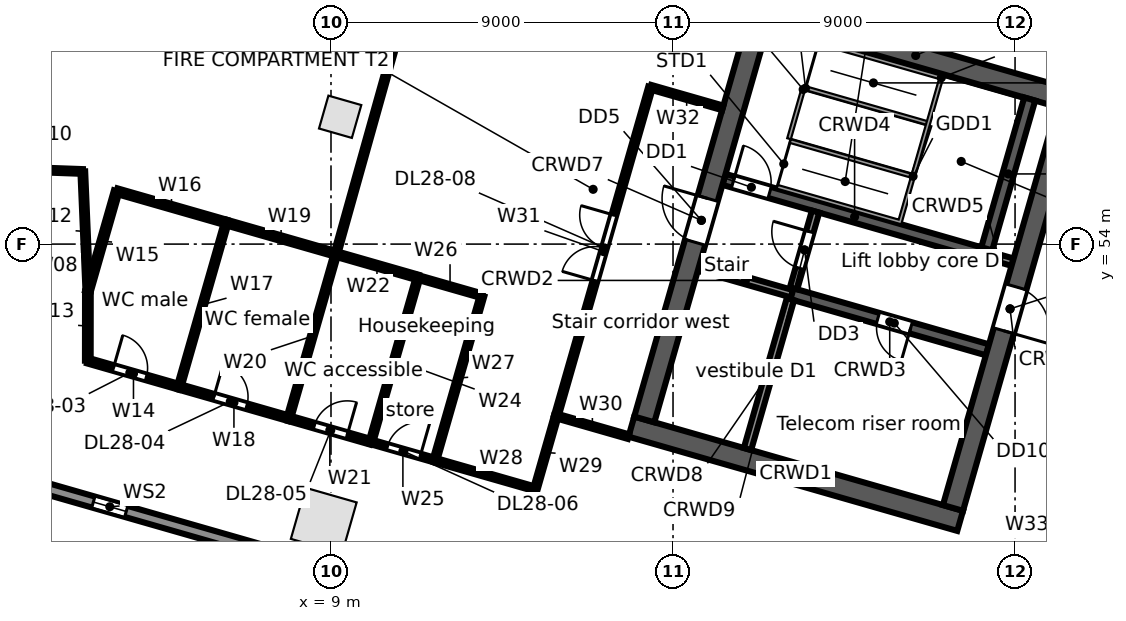
"""IFC4 building model, lengths in metres.
Left out: names, types, materials, properties, quantities, classifications, styles, units other than length and angle.
Written with IfcOpenShell. Run it as: python <this file> out.ifc"""

import sys

from ifc_helpers import new_model, si_unit, direction, frame, frame_2d, origin, origin_2d, place, context, subcontext, project, spatial, rectangle, extrude, element, fill, save


model = new_model("IFC4")
c1 = context("Model", 3, precision=1e-05, world=origin(), true_north=direction((0.0, 1.0)))
c2 = subcontext(c1, "Body", "Model", "MODEL_VIEW")
j1 = project(units=[si_unit("LENGTHUNIT", "METRE"), si_unit("PLANEANGLEUNIT", "RADIAN")], contexts=[c1])
p1 = place(None, origin())
s1 = spatial("IfcSite", under=j1, at=p1, CompositionType="ELEMENT")
p2 = place(p1, origin())
s2 = spatial("IfcBuilding", under=s1, at=p2, CompositionType="ELEMENT")
p3 = place(p2, frame((0.0, 0.0, 145.5)))
s3 = spatial("IfcBuildingStorey", under=s2, at=p3, CompositionType="ELEMENT", Elevation=145.5)
p4 = place(p3, frame((8.81, 46.722, 0.0), z_axis=(0.0, 0.0, 1.0), x_axis=(0.961261695938, -0.275637355817, 0.0)))
e1 = element("IfcColumn", 1, at=p4, inside=s3, PredefinedType="COLUMN", context=c2, shape_type="SweptSolid", body=[
    extrude(rectangle(XDim=1.4, YDim=1.4, at=origin_2d()), origin(), (0.0, 0.0, 1.0), 4.4),
])
p5 = place(p3, frame((9.241, 57.35, 0.0), z_axis=(0.0, 0.0, 1.0), x_axis=(0.961261695938, -0.275637355817, 0.0)))
e2 = element("IfcColumn", 2, at=p5, inside=s3, PredefinedType="COLUMN", context=c2, shape_type="SweptSolid", body=[
    extrude(rectangle(XDim=0.9, YDim=0.9, at=origin_2d()), origin(), (0.0, 0.0, 1.0), 4.4),
])
p6 = place(p3, frame((25.398, 40.717, 0.0), z_axis=(0.0, 0.0, 1.0), x_axis=(-0.961262423262, 0.275634819324, 0.0)))
e3 = element("IfcWall", 3, at=p6, inside=s3, PredefinedType="STANDARD", context=c2, shape_type="SweptSolid", body=[
    extrude(rectangle(XDim=26.359, YDim=0.3, at=frame_2d((13.179, 0.0))), origin(), (0.0, 0.0, 1.0), 4.05),
])
p7 = place(p6, frame((22.664, 0.0, 0.6)))
e4 = element("IfcOpeningElement", 4, at=p7, cuts=e3, PredefinedType="OPENING", context=c2, shape_type="SweptSolid", body=[
    extrude(rectangle(XDim=0.9, YDim=2.8, at=frame_2d((0.45, 1.4))), frame((0.0, 0.16, 0.0), z_axis=(0.0, -1.0, 0.0), x_axis=(1.0, 0.0, 0.0)), (0.0, 0.0, 1.0), 0.32),
])
p8 = place(p6, frame((13.844, 0.0, 0.6)))
e5 = element("IfcOpeningElement", 5, at=p8, cuts=e3, PredefinedType="OPENING", context=c2, shape_type="SweptSolid", body=[
    extrude(rectangle(XDim=0.9, YDim=2.8, at=frame_2d((0.45, 1.4))), frame((0.0, 0.16, 0.0), z_axis=(0.0, -1.0, 0.0), x_axis=(1.0, 0.0, 0.0)), (0.0, 0.0, 1.0), 0.32),
])
p9 = place(p6, frame((5.023, 0.0, 0.6)))
e6 = element("IfcOpeningElement", 6, at=p9, cuts=e3, PredefinedType="OPENING", context=c2, shape_type="SweptSolid", body=[
    extrude(rectangle(XDim=0.9, YDim=2.8, at=frame_2d((0.45, 1.4))), frame((0.0, 0.16, 0.0), z_axis=(0.0, -1.0, 0.0), x_axis=(1.0, 0.0, 0.0)), (0.0, 0.0, 1.0), 0.32),
])
p10 = place(p3, frame((16.904, 49.197, 0.0), z_axis=(0.0, 0.0, 1.0), x_axis=(0.96126248289, -0.275634611374, 0.0)))
e7 = element("IfcWall", 7, at=p10, inside=s3, PredefinedType="SOLIDWALL", context=c2, shape_type="SweptSolid", body=[
    extrude(rectangle(XDim=9.0, YDim=0.55, at=frame_2d((4.5, 0.0))), origin(), (0.0, 0.0, 1.0), 4.05),
])
p11 = place(p3, frame((18.68, 53.396, 0.0), z_axis=(0.0, 0.0, 1.0), x_axis=(0.961234387647, -0.275732573349, 0.0)))
e8 = element("IfcWall", 8, at=p11, inside=s3, PredefinedType="SOLIDWALL", context=c2, shape_type="SweptSolid", body=[
    extrude(rectangle(XDim=2.55, YDim=0.2, at=frame_2d((1.275, 0.0))), origin(), (0.0, 0.0, 1.0), 4.05),
])
p12 = place(p3, frame((21.131, 52.692, 0.0), z_axis=(0.0, 0.0, 1.0), x_axis=(0.961265220997, -0.27562506218, 0.0)))
e9 = element("IfcWall", 9, at=p12, inside=s3, PredefinedType="SOLIDWALL", context=c2, shape_type="SweptSolid", body=[
    extrude(rectangle(XDim=5.35, YDim=0.3, at=frame_2d((2.675, 0.0))), origin(), (0.0, 0.0, 1.0), 4.05),
])
p13 = place(p12, frame((2.35, 0.0, 0.0)))
e10 = element("IfcOpeningElement", 10, at=p13, cuts=e9, PredefinedType="OPENING", context=c2, shape_type="SweptSolid", body=[
    extrude(rectangle(XDim=0.9, YDim=2.1, at=frame_2d((0.45, 1.05))), frame((0.0, 0.16, 0.0), z_axis=(0.0, -1.0, 0.0), x_axis=(1.0, 0.0, 0.0)), (0.0, 0.0, 1.0), 0.32),
])
p14 = place(p3, frame((19.341, 55.702, 0.0), z_axis=(0.0, 0.0, 1.0), x_axis=(0.961263228157, -0.27563201228, 0.0)))
e11 = element("IfcWall", 11, at=p14, inside=s3, PredefinedType="SOLIDWALL", context=c2, shape_type="SweptSolid", body=[
    extrude(rectangle(XDim=7.15, YDim=0.3, at=frame_2d((3.575, 0.0))), origin(), (0.0, 0.0, 1.0), 4.05),
])
p15 = place(p14, frame((0.25, 0.0, 0.0)))
e12 = element("IfcOpeningElement", 12, at=p15, cuts=e11, PredefinedType="OPENING", context=c2, shape_type="SweptSolid", body=[
    extrude(rectangle(XDim=1.0, YDim=2.1, at=frame_2d((0.5, 1.05))), frame((0.0, 0.16, 0.0), z_axis=(0.0, -1.0, 0.0), x_axis=(1.0, 0.0, 0.0)), (0.0, 0.0, 1.0), 0.32),
])
p16 = place(p3, frame((26.214, 53.732, 0.0), z_axis=(0.0, 0.0, 1.0), x_axis=(0.961240918172, -0.275709806194, 0.0)))
e13 = element("IfcWall", 13, at=p16, inside=s3, PredefinedType="SOLIDWALL", context=c2, shape_type="SweptSolid", body=[
    extrude(rectangle(XDim=0.75, YDim=0.2, at=frame_2d((0.375, 0.0))), origin(), (0.0, 0.0, 1.0), 4.05),
])
p17 = place(p3, frame((20.06, 60.204, 0.0), z_axis=(0.0, 0.0, 1.0), x_axis=(0.96126248289, -0.275634611374, 0.0)))
e14 = element("IfcWall", 14, at=p17, inside=s3, PredefinedType="SOLIDWALL", context=c2, shape_type="SweptSolid", body=[
    extrude(rectangle(XDim=9.0, YDim=0.55, at=frame_2d((4.5, 0.0))), origin(), (0.0, 0.0, 1.0), 4.05),
])
p18 = place(p3, frame((17.244, 49.386, 0.0), z_axis=(0.0, 0.0, 1.0), x_axis=(0.275632146085, 0.96126318979, 0.0)))
e15 = element("IfcWall", 15, at=p18, inside=s3, PredefinedType="SOLIDWALL", context=c2, shape_type="SweptSolid", body=[
    extrude(rectangle(XDim=10.9, YDim=0.55, at=frame_2d((5.45, 0.0))), origin(), (0.0, 0.0, 1.0), 4.05),
])
p19 = place(p18, frame((4.85, 0.0, 0.0)))
e16 = element("IfcOpeningElement", 16, at=p19, cuts=e15, PredefinedType="OPENING", context=c2, shape_type="SweptSolid", body=[
    extrude(rectangle(XDim=1.2, YDim=2.1, at=frame_2d((0.6, 1.05))), frame((0.0, 0.285, 0.0), z_axis=(0.0, -1.0, 0.0), x_axis=(1.0, 0.0, 0.0)), (0.0, 0.0, 1.0), 0.57),
])
p20 = place(p3, frame((19.959, 48.607, 0.0), z_axis=(0.0, 0.0, 1.0), x_axis=(0.275641165445, 0.961260603537, 0.0)))
e17 = element("IfcWall", 17, at=p20, inside=s3, PredefinedType="SOLIDWALL", context=c2, shape_type="SweptSolid", body=[
    extrude(rectangle(XDim=4.1, YDim=0.2, at=frame_2d((2.05, 0.0))), origin(), (0.0, 0.0, 1.0), 4.05),
])
p21 = place(p3, frame((21.172, 52.837, 0.0), z_axis=(0.0, 0.0, 1.0), x_axis=(0.275657676022, 0.961255868981, 0.0)))
e18 = element("IfcWall", 18, at=p21, inside=s3, PredefinedType="PARTITIONING", context=c2, shape_type="SweptSolid", body=[
    extrude(rectangle(XDim=2.1, YDim=0.2, at=frame_2d((1.05, 0.0))), origin(), (0.0, 0.0, 1.0), 4.05),
])
p22 = place(p21, frame((0.55, 0.0, 0.0)))
e19 = element("IfcOpeningElement", 19, at=p22, cuts=e18, PredefinedType="OPENING", context=c2, shape_type="SweptSolid", body=[
    extrude(rectangle(XDim=1.0, YDim=2.1, at=frame_2d((0.5, 1.05))), frame((0.0, 0.11, 0.0), z_axis=(0.0, -1.0, 0.0), x_axis=(1.0, 0.0, 0.0)), (0.0, 0.0, 1.0), 0.22),
])
p23 = place(p3, frame((26.256, 53.876, 0.0), z_axis=(0.0, 0.0, 1.0), x_axis=(0.275641165445, 0.961260603537, 0.0)))
e20 = element("IfcWall", 20, at=p23, inside=s3, PredefinedType="SOLIDWALL", context=c2, shape_type="SweptSolid", body=[
    extrude(rectangle(XDim=4.1, YDim=0.3, at=frame_2d((2.05, 0.0))), origin(), (0.0, 0.0, 1.0), 4.05),
])
p24 = place(p3, frame((25.366, 47.057, 0.0), z_axis=(0.0, 0.0, 1.0), x_axis=(0.275632146085, 0.96126318979, 0.0)))
e21 = element("IfcWall", 21, at=p24, inside=s3, PredefinedType="SOLIDWALL", context=c2, shape_type="SweptSolid", body=[
    extrude(rectangle(XDim=10.9, YDim=0.55, at=frame_2d((5.45, 0.0))), origin(), (0.0, 0.0, 1.0), 4.05),
])
p25 = place(p24, frame((4.85, 0.0, 0.0)))
e22 = element("IfcOpeningElement", 22, at=p25, cuts=e21, PredefinedType="OPENING", context=c2, shape_type="SweptSolid", body=[
    extrude(rectangle(XDim=1.2, YDim=2.1, at=frame_2d((0.6, 1.05))), frame((0.0, 0.285, 0.0), z_axis=(0.0, -1.0, 0.0), x_axis=(1.0, 0.0, 0.0)), (0.0, 0.0, 1.0), 0.57),
])
p26 = place(p3, frame((0.0, 56.0, 0.0), z_axis=(0.0, 0.0, 1.0), x_axis=(0.999349313684, -0.036068673934, 0.0)))
e23 = element("IfcWall", 23, at=p26, inside=s3, PredefinedType="PARTITIONING", context=c2, shape_type="SweptSolid", body=[
    extrude(rectangle(XDim=2.471, YDim=0.125, at=frame_2d((1.235, 0.0))), origin(), (0.0, 0.0, 1.0), 4.05),
])
p27 = place(p26, frame((0.7, 0.0, 0.0)))
e24 = element("IfcOpeningElement", 24, at=p27, cuts=e23, PredefinedType="OPENING", context=c2, shape_type="SweptSolid", body=[
    extrude(rectangle(XDim=0.9, YDim=2.1, at=frame_2d((0.45, 1.05))), frame((0.0, 0.073, 0.0), z_axis=(0.0, -1.0, 0.0), x_axis=(1.0, 0.0, 0.0)), (0.0, 0.0, 1.0), 0.145),
])
p28 = place(p3, frame((2.469, 55.911, 0.0), z_axis=(0.0, 0.0, 1.0), x_axis=(0.042391721597, -0.99910106693, 0.0)))
e25 = element("IfcWall", 25, at=p28, inside=s3, PredefinedType="PARTITIONING", context=c2, shape_type="SweptSolid", body=[
    extrude(rectangle(XDim=3.162, YDim=0.125, at=frame_2d((1.581, 0.0))), origin(), (0.0, 0.0, 1.0), 4.05),
])
p29 = place(p3, frame((2.601, 50.932, 0.0), z_axis=(0.0, 0.0, 1.0), x_axis=(0.001073104681, 0.999999424223, 0.0)))
e26 = element("IfcWall", 26, at=p29, inside=s3, PredefinedType="PARTITIONING", context=c2, shape_type="SweptSolid", body=[
    extrude(rectangle(XDim=1.82, YDim=0.15, at=frame_2d((0.91, 0.0))), origin(), (0.0, 0.0, 1.0), 4.05),
])
p30 = place(p3, frame((2.601, 50.932, 0.0), z_axis=(0.0, 0.0, 1.0), x_axis=(0.961265528111, -0.275623991092, 0.0)))
e27 = element("IfcWall", 27, at=p30, inside=s3, PredefinedType="PARTITIONING", context=c2, shape_type="SweptSolid", body=[
    extrude(rectangle(XDim=2.5, YDim=0.15, at=frame_2d((1.25, 0.0))), origin(), (0.0, 0.0, 1.0), 4.05),
])
p31 = place(p30, frame((0.7, 0.0, 0.0)))
e28 = element("IfcOpeningElement", 28, at=p31, cuts=e27, PredefinedType="OPENING", context=c2, shape_type="SweptSolid", body=[
    extrude(rectangle(XDim=0.9, YDim=2.1, at=frame_2d((0.45, 1.05))), frame((0.0, 0.085, 0.0), z_axis=(0.0, -1.0, 0.0), x_axis=(1.0, 0.0, 0.0)), (0.0, 0.0, 1.0), 0.17),
])
p32 = place(p3, frame((2.603, 52.752, 0.0), z_axis=(0.0, 0.0, 1.0), x_axis=(0.27569433145, 0.961245356611, 0.0)))
e29 = element("IfcWall", 29, at=p32, inside=s3, PredefinedType="PARTITIONING", context=c2, shape_type="SweptSolid", body=[
    extrude(rectangle(XDim=2.75, YDim=0.15, at=frame_2d((1.375, 0.0))), origin(), (0.0, 0.0, 1.0), 4.05),
])
p33 = place(p3, frame((3.361, 55.395, 0.0), z_axis=(0.0, 0.0, 1.0), x_axis=(0.961268664977, -0.27561305073, 0.0)))
e30 = element("IfcWall", 30, at=p33, inside=s3, PredefinedType="PARTITIONING", context=c2, shape_type="SweptSolid", body=[
    extrude(rectangle(XDim=3.0, YDim=0.15, at=frame_2d((1.5, 0.0))), origin(), (0.0, 0.0, 1.0), 4.05),
])
p34 = place(p3, frame((5.004, 50.243, 0.0), z_axis=(0.0, 0.0, 1.0), x_axis=(0.275838825927, 0.961203902464, 0.0)))
e31 = element("IfcWall", 31, at=p34, inside=s3, PredefinedType="PARTITIONING", context=c2, shape_type="SweptSolid", body=[
    extrude(rectangle(XDim=4.5, YDim=0.125, at=frame_2d((2.25, 0.0))), origin(), (0.0, 0.0, 1.0), 4.05),
])
p35 = place(p3, frame((5.004, 50.243, 0.0), z_axis=(0.0, 0.0, 1.0), x_axis=(0.961268664977, -0.27561305073, 0.0)))
e32 = element("IfcWall", 32, at=p35, inside=s3, PredefinedType="PARTITIONING", context=c2, shape_type="SweptSolid", body=[
    extrude(rectangle(XDim=3.0, YDim=0.15, at=frame_2d((1.5, 0.0))), origin(), (0.0, 0.0, 1.0), 4.05),
])
p36 = place(p35, frame((0.95, 0.0, 0.0)))
e33 = element("IfcOpeningElement", 33, at=p36, cuts=e32, PredefinedType="OPENING", context=c2, shape_type="SweptSolid", body=[
    extrude(rectangle(XDim=0.9, YDim=2.1, at=frame_2d((0.45, 1.05))), frame((0.0, 0.085, 0.0), z_axis=(0.0, -1.0, 0.0), x_axis=(1.0, 0.0, 0.0)), (0.0, 0.0, 1.0), 0.17),
])
p37 = place(p3, frame((6.245, 54.568, 0.0), z_axis=(0.0, 0.0, 1.0), x_axis=(0.961240918172, -0.275709806194, 0.0)))
e34 = element("IfcWall", 34, at=p37, inside=s3, PredefinedType="PARTITIONING", context=c2, shape_type="SweptSolid", body=[
    extrude(rectangle(XDim=3.0, YDim=0.15, at=frame_2d((1.5, 0.0))), origin(), (0.0, 0.0, 1.0), 3.23),
])
p38 = place(p3, frame((7.888, 49.416, 0.0), z_axis=(0.0, 0.0, 1.0), x_axis=(0.275803080638, 0.96121415965, 0.0)))
e35 = element("IfcWall", 35, at=p38, inside=s3, PredefinedType="PARTITIONING", context=c2, shape_type="SweptSolid", body=[
    extrude(rectangle(XDim=4.5, YDim=0.125, at=frame_2d((2.25, 0.0))), origin(), (0.0, 0.0, 1.0), 3.23),
])
p39 = place(p3, frame((7.888, 49.416, 0.0), z_axis=(0.0, 0.0, 1.0), x_axis=(0.9611628742, -0.275981755301, 0.0)))
e36 = element("IfcWall", 36, at=p39, inside=s3, PredefinedType="PARTITIONING", context=c2, shape_type="SweptSolid", body=[
    extrude(rectangle(XDim=2.25, YDim=0.15, at=frame_2d((1.125, 0.0))), origin(), (0.0, 0.0, 1.0), 3.118),
])
p40 = place(p39, frame((0.7, 0.0, 0.0)))
e37 = element("IfcOpeningElement", 37, at=p40, cuts=e36, PredefinedType="OPENING", context=c2, shape_type="SweptSolid", body=[
    extrude(rectangle(XDim=0.9, YDim=2.1, at=frame_2d((0.45, 1.05))), frame((0.0, 0.085, 0.0), z_axis=(0.0, -1.0, 0.0), x_axis=(1.0, 0.0, 0.0)), (0.0, 0.0, 1.0), 0.17),
])
p41 = place(p3, frame((9.129, 53.741, 0.0), z_axis=(0.0, 0.0, 1.0), x_axis=(0.961273691875, -0.275595517578, 0.0)))
e38 = element("IfcWall", 38, at=p41, inside=s3, PredefinedType="PARTITIONING", context=c2, shape_type="SweptSolid", body=[
    extrude(rectangle(XDim=2.249, YDim=0.15, at=frame_2d((1.125, 0.0))), origin(), (0.0, 0.0, 1.0), 3.118),
])
p42 = place(p3, frame((9.129, 53.741, 0.0), z_axis=(0.0, 0.0, 1.0), x_axis=(0.269791738843, 0.962918697322, 0.0)))
e39 = element("IfcWall", 39, at=p42, inside=s3, PredefinedType="PARTITIONING", context=c2, shape_type="SweptSolid", body=[
    extrude(rectangle(XDim=14.886, YDim=0.125, at=frame_2d((7.443, 0.0))), origin(), (0.0, 0.0, 1.0), 3.118),
])
p43 = place(p3, frame((10.051, 48.795, 0.0), z_axis=(0.0, 0.0, 1.0), x_axis=(0.275530671241, 0.961292280841, 0.0)))
e40 = element("IfcWall", 40, at=p43, inside=s3, PredefinedType="PARTITIONING", context=c2, shape_type="SweptSolid", body=[
    extrude(rectangle(XDim=4.5, YDim=0.125, at=frame_2d((2.25, 0.0))), origin(), (0.0, 0.0, 1.0), 4.05),
])
p44 = place(p3, frame((10.051, 48.795, 0.0), z_axis=(0.0, 0.0, 1.0), x_axis=(0.961313033798, -0.275458256455, 0.0)))
e41 = element("IfcWall", 41, at=p44, inside=s3, PredefinedType="PARTITIONING", context=c2, shape_type="SweptSolid", body=[
    extrude(rectangle(XDim=1.75, YDim=0.125, at=frame_2d((0.875, 0.0))), origin(), (0.0, 0.0, 1.0), 4.05),
])
p45 = place(p44, frame((0.45, 0.0, 0.0)))
e42 = element("IfcOpeningElement", 42, at=p45, cuts=e41, PredefinedType="OPENING", context=c2, shape_type="SweptSolid", body=[
    extrude(rectangle(XDim=0.9, YDim=2.1, at=frame_2d((0.45, 1.05))), frame((0.0, 0.073, 0.0), z_axis=(0.0, -1.0, 0.0), x_axis=(1.0, 0.0, 0.0)), (0.0, 0.0, 1.0), 0.145),
])
p46 = place(p3, frame((11.291, 53.121, 0.0), z_axis=(0.0, 0.0, 1.0), x_axis=(0.961329010357, -0.275402494264, 0.0)))
e43 = element("IfcWall", 43, at=p46, inside=s3, PredefinedType="PARTITIONING", context=c2, shape_type="SweptSolid", body=[
    extrude(rectangle(XDim=1.751, YDim=0.125, at=frame_2d((0.875, 0.0))), origin(), (0.0, 0.0, 1.0), 4.05),
])
p47 = place(p3, frame((11.733, 48.313, 0.0), z_axis=(0.0, 0.0, 1.0), x_axis=(0.275795676316, 0.961216284155, 0.0)))
e44 = element("IfcWall", 44, at=p47, inside=s3, PredefinedType="PARTITIONING", context=c2, shape_type="SweptSolid", body=[
    extrude(rectangle(XDim=4.5, YDim=0.125, at=frame_2d((2.25, 0.0))), origin(), (0.0, 0.0, 1.0), 4.05),
])
p48 = place(p3, frame((11.733, 48.313, 0.0), z_axis=(0.0, 0.0, 1.0), x_axis=(0.961272337704, -0.275600240865, 0.0)))
e45 = element("IfcWall", 45, at=p48, inside=s3, PredefinedType="PARTITIONING", context=c2, shape_type="SweptSolid", body=[
    extrude(rectangle(XDim=2.75, YDim=0.125, at=frame_2d((1.375, 0.0))), origin(), (0.0, 0.0, 1.0), 4.05),
])
p49 = place(p3, frame((14.377, 47.555, 0.0), z_axis=(0.0, 0.0, 1.0), x_axis=(0.275446387355, 0.961316434736, 0.0)))
e46 = element("IfcWall", 46, at=p49, inside=s3, PredefinedType="PARTITIONING", context=c2, shape_type="SweptSolid", body=[
    extrude(rectangle(XDim=2.0, YDim=0.125, at=frame_2d((1.0, 0.0))), origin(), (0.0, 0.0, 1.0), 4.05),
])
p50 = place(p3, frame((14.928, 49.478, 0.0), z_axis=(0.0, 0.0, 1.0), x_axis=(0.961243778232, -0.27569983462, 0.0)))
e47 = element("IfcWall", 47, at=p50, inside=s3, PredefinedType="PARTITIONING", context=c2, shape_type="SweptSolid", body=[
    extrude(rectangle(XDim=1.977, YDim=0.125, at=frame_2d((0.988, 0.0))), origin(), (0.0, 0.0, 1.0), 4.05),
])
p51 = place(p3, frame((14.928, 49.478, 0.0), z_axis=(0.0, 0.0, 1.0), x_axis=(0.275674053528, 0.961251172281, 0.0)))
e48 = element("IfcWall", 48, at=p51, inside=s3, PredefinedType="PARTITIONING", context=c2, shape_type="SweptSolid", body=[
    extrude(rectangle(XDim=9.0, YDim=0.125, at=frame_2d((4.5, 0.0))), origin(), (0.0, 0.0, 1.0), 3.118),
])
p52 = place(p51, frame((3.7, 0.0, 0.0)))
e49 = element("IfcOpeningElement", 49, at=p52, cuts=e48, PredefinedType="OPENING", context=c2, shape_type="SweptSolid", body=[
    extrude(rectangle(XDim=1.8, YDim=2.1, at=frame_2d((0.9, 1.05))), frame((0.0, 0.073, 0.0), z_axis=(0.0, -1.0, 0.0), x_axis=(1.0, 0.0, 0.0)), (0.0, 0.0, 1.0), 0.145),
])
p53 = place(p3, frame((17.409, 58.129, 0.0), z_axis=(0.0, 0.0, 1.0), x_axis=(0.961253165474, -0.275667103345, 0.0)))
e50 = element("IfcWall", 50, at=p53, inside=s3, PredefinedType="PARTITIONING", context=c2, shape_type="SweptSolid", body=[
    extrude(rectangle(XDim=1.977, YDim=0.125, at=frame_2d((0.988, 0.0))), origin(), (0.0, 0.0, 1.0), 4.05),
])
p54 = place(p3, frame((26.373, 42.206, 0.0), z_axis=(0.0, 0.0, 1.0), x_axis=(0.52987567935, 0.848075329457, 0.0)))
e51 = element("IfcWall", 51, at=p54, inside=s3, PredefinedType="PARTITIONING", context=c2, shape_type="SweptSolid", body=[
    extrude(rectangle(XDim=6.232, YDim=0.25, at=frame_2d((3.116, 0.0))), origin(), (0.0, 0.0, 1.0), 4.05),
])
p55 = place(p54, frame((2.2, 0.0, 0.0)))
e52 = element("IfcOpeningElement", 52, at=p55, cuts=e51, PredefinedType="OPENING", context=c2, shape_type="SweptSolid", body=[
    extrude(rectangle(XDim=1.8, YDim=2.1, at=frame_2d((0.9, 1.05))), frame((0.0, 0.135, 0.0), z_axis=(0.0, -1.0, 0.0), x_axis=(1.0, 0.0, 0.0)), (0.0, 0.0, 1.0), 0.27),
])
p56 = place(p7, origin())
e53 = element("IfcWindow", 53, at=p56, inside=s3, PartitioningType="SINGLE_PANEL", PredefinedType="WINDOW", context=c2, shape_type="SweptSolid", body=[
    extrude(rectangle(XDim=0.9, YDim=2.8, at=frame_2d((0.45, 1.4))), frame((0.0, 0.03, 0.0), z_axis=(0.0, -1.0, 0.0), x_axis=(1.0, 0.0, 0.0)), (0.0, 0.0, 1.0), 0.06),
])
fill(e4, e53)
p57 = place(p15, origin())
e54 = element("IfcDoor", 54, at=p57, inside=s3, OperationType="SINGLE_SWING_LEFT", PredefinedType="DOOR", context=c2, shape_type="SweptSolid", body=[
    extrude(rectangle(XDim=1.0, YDim=2.1, at=frame_2d((0.5, 1.05))), frame((0.0, 0.025, 0.0), z_axis=(0.0, -1.0, 0.0), x_axis=(1.0, 0.0, 0.0)), (0.0, 0.0, 1.0), 0.05),
])
fill(e12, e54)
p58 = place(p22, origin())
e55 = element("IfcDoor", 55, at=p58, inside=s3, OperationType="SINGLE_SWING_RIGHT", PredefinedType="DOOR", context=c2, shape_type="SweptSolid", body=[
    extrude(rectangle(XDim=1.0, YDim=2.1, at=frame_2d((0.5, 1.05))), frame((0.0, 0.025, 0.0), z_axis=(0.0, -1.0, 0.0), x_axis=(1.0, 0.0, 0.0)), (0.0, 0.0, 1.0), 0.05),
])
fill(e19, e55)
p59 = place(p19, origin())
e56 = element("IfcDoor", 56, at=p59, inside=s3, OperationType="SINGLE_SWING_RIGHT", PredefinedType="DOOR", context=c2, shape_type="SweptSolid", body=[
    extrude(rectangle(XDim=1.2, YDim=2.1, at=frame_2d((0.6, 1.05))), frame((0.0, 0.025, 0.0), z_axis=(0.0, -1.0, 0.0), x_axis=(1.0, 0.0, 0.0)), (0.0, 0.0, 1.0), 0.05),
])
fill(e16, e56)
p60 = place(p25, frame((1.2, 0.0, 0.0), z_axis=(0.0, 0.0, 1.0), x_axis=(-1.0, 0.0, 0.0)))
e57 = element("IfcDoor", 57, at=p60, inside=s3, OperationType="SINGLE_SWING_RIGHT", PredefinedType="DOOR", context=c2, shape_type="SweptSolid", body=[
    extrude(rectangle(XDim=1.2, YDim=2.1, at=frame_2d((0.6, 1.05))), frame((0.0, 0.025, 0.0), z_axis=(0.0, -1.0, 0.0), x_axis=(1.0, 0.0, 0.0)), (0.0, 0.0, 1.0), 0.05),
])
fill(e22, e57)
p61 = place(p13, frame((0.9, 0.0, 0.0), z_axis=(0.0, 0.0, 1.0), x_axis=(-1.0, 0.0, 0.0)))
e58 = element("IfcDoor", 58, at=p61, inside=s3, OperationType="SINGLE_SWING_LEFT", PredefinedType="DOOR", context=c2, shape_type="SweptSolid", body=[
    extrude(rectangle(XDim=0.9, YDim=2.1, at=frame_2d((0.45, 1.05))), frame((0.0, 0.025, 0.0), z_axis=(0.0, -1.0, 0.0), x_axis=(1.0, 0.0, 0.0)), (0.0, 0.0, 1.0), 0.05),
])
fill(e10, e58)
p62 = place(p31, origin())
e59 = element("IfcDoor", 59, at=p62, inside=s3, OperationType="SINGLE_SWING_LEFT", PredefinedType="DOOR", context=c2, shape_type="SweptSolid", body=[
    extrude(rectangle(XDim=0.9, YDim=2.1, at=frame_2d((0.45, 1.05))), frame((0.0, 0.025, 0.0), z_axis=(0.0, -1.0, 0.0), x_axis=(1.0, 0.0, 0.0)), (0.0, 0.0, 1.0), 0.05),
])
fill(e28, e59)
p63 = place(p36, origin())
e60 = element("IfcDoor", 60, at=p63, inside=s3, OperationType="SINGLE_SWING_LEFT", PredefinedType="DOOR", context=c2, shape_type="SweptSolid", body=[
    extrude(rectangle(XDim=0.9, YDim=2.1, at=frame_2d((0.45, 1.05))), frame((0.0, 0.025, 0.0), z_axis=(0.0, -1.0, 0.0), x_axis=(1.0, 0.0, 0.0)), (0.0, 0.0, 1.0), 0.05),
])
fill(e33, e60)
p64 = place(p40, origin())
e61 = element("IfcDoor", 61, at=p64, inside=s3, OperationType="SINGLE_SWING_RIGHT", PredefinedType="DOOR", context=c2, shape_type="SweptSolid", body=[
    extrude(rectangle(XDim=0.9, YDim=2.1, at=frame_2d((0.45, 1.05))), frame((0.0, 0.025, 0.0), z_axis=(0.0, -1.0, 0.0), x_axis=(1.0, 0.0, 0.0)), (0.0, 0.0, 1.0), 0.05),
])
fill(e37, e61)
p65 = place(p45, origin())
e62 = element("IfcDoor", 62, at=p65, inside=s3, OperationType="SINGLE_SWING_RIGHT", PredefinedType="DOOR", context=c2, shape_type="SweptSolid", body=[
    extrude(rectangle(XDim=0.9, YDim=2.1, at=frame_2d((0.45, 1.05))), frame((0.0, 0.025, 0.0), z_axis=(0.0, -1.0, 0.0), x_axis=(1.0, 0.0, 0.0)), (0.0, 0.0, 1.0), 0.05),
])
fill(e42, e62)
p66 = place(p52, origin())
e63 = element("IfcDoor", 63, at=p66, inside=s3, OperationType="DOUBLE_DOOR_SINGLE_SWING", PredefinedType="DOOR", context=c2, shape_type="SweptSolid", body=[
    extrude(rectangle(XDim=1.8, YDim=2.1, at=frame_2d((0.9, 1.05))), frame((0.0, 0.025, 0.0), z_axis=(0.0, -1.0, 0.0), x_axis=(1.0, 0.0, 0.0)), (0.0, 0.0, 1.0), 0.05),
])
fill(e49, e63)
save(model, sys.argv[1])
